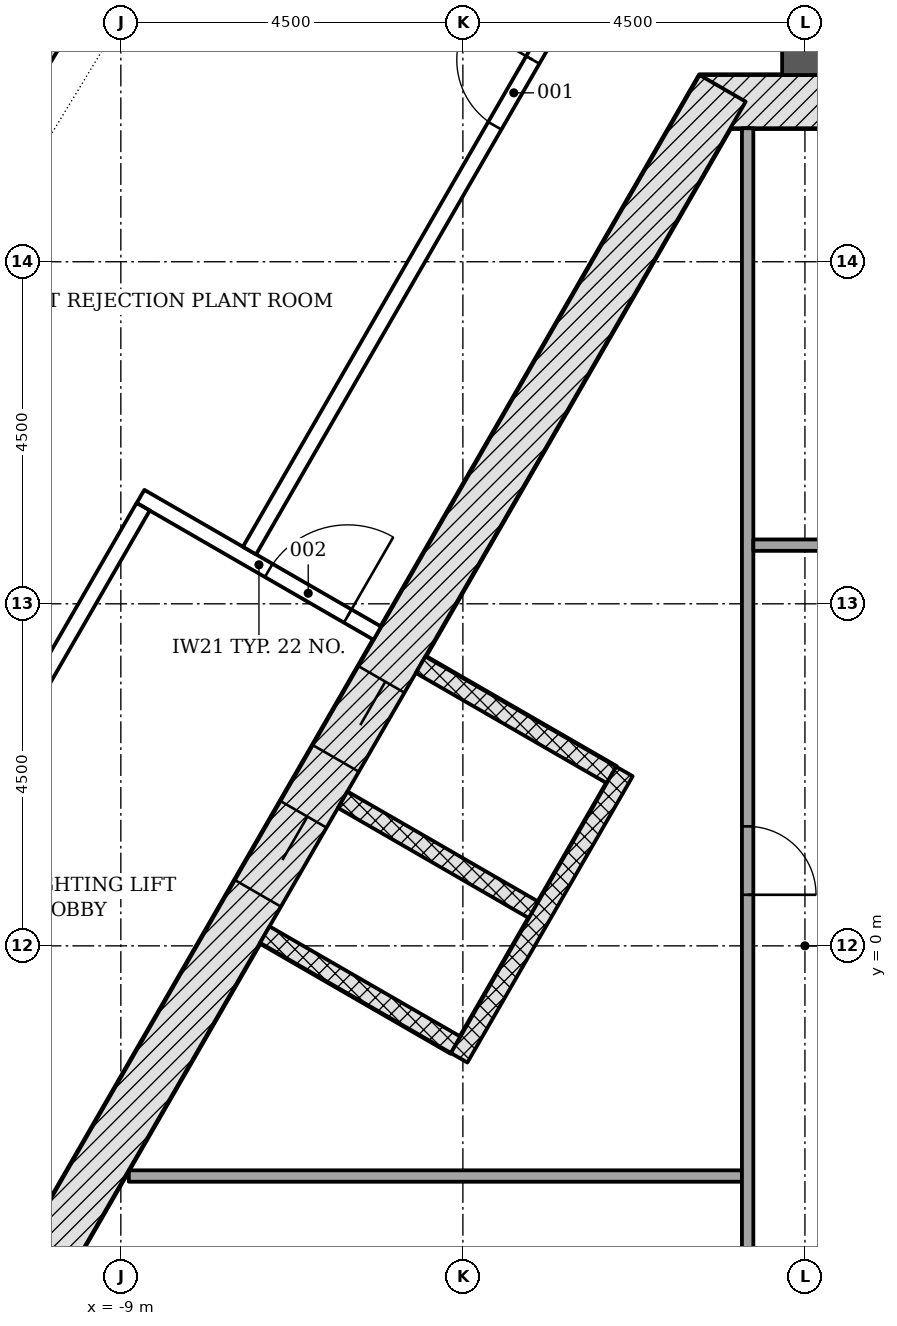
"""IFC4 building model, lengths in metres.
Left out: names, types, materials, properties, quantities, classifications, styles, units other than length and angle.
Written with IfcOpenShell. Run it as: python <this file> out.ifc"""

import sys

from ifc_helpers import new_model, si_unit, direction, frame, frame_2d, origin, place, context, subcontext, project, spatial, polyline, rectangle, outline, extrude, element, fill, save


model = new_model("IFC4")
c1 = context("Model", 3, precision=1e-05, world=origin(), true_north=direction((0.0, 1.0)))
c2 = subcontext(c1, "Body", "Model", "MODEL_VIEW")
j1 = project(units=[si_unit("LENGTHUNIT", "METRE"), si_unit("PLANEANGLEUNIT", "RADIAN")], contexts=[c1])
p1 = place(None, origin())
s1 = spatial("IfcSite", under=j1, at=p1, CompositionType="ELEMENT")
p2 = place(p1, origin())
s2 = spatial("IfcBuilding", under=s1, at=p2, CompositionType="ELEMENT")
p3 = place(p2, frame((0.0, 0.0, 297.6)))
s3 = spatial("IfcBuildingStorey", under=s2, at=p3, CompositionType="ELEMENT", Elevation=297.6)
p4 = place(p3, frame((1.386, 11.106, -0.25), z_axis=(0.0, 0.0, 1.0), x_axis=(-1.0, 0.0, 0.0)))
e1 = element("IfcWall", 1, at=p4, inside=s3, PredefinedType="SHEAR", context=c2, shape_type="SweptSolid", body=[
    extrude(rectangle(XDim=2.771, YDim=0.7, at=frame_2d((1.386, 0.0))), origin(), (0.0, 0.0, 1.0), 4.5),
])
p5 = place(p3, frame((-1.083, 11.281, -0.25), z_axis=(0.0, 0.0, 1.0), x_axis=(-0.500001446645, -0.866024568562, 0.0)))
e2 = element("IfcWall", 2, at=p5, inside=s3, PredefinedType="SHEAR", context=c2, shape_type="SweptSolid", body=[
    extrude(rectangle(XDim=18.458, YDim=0.7, at=frame_2d((9.229, 0.0))), origin(), (0.0, 0.0, 1.0), 4.5),
])
p6 = place(p5, frame((8.979, 0.0, 0.25)))
e3 = element("IfcOpeningElement", 3, at=p6, cuts=e2, PredefinedType="OPENING", context=c2, shape_type="SweptSolid", body=[
    extrude(rectangle(XDim=1.2, YDim=2.1, at=frame_2d((0.6, 1.05))), frame((0.0, 0.36, 0.0), z_axis=(0.0, -1.0, 0.0), x_axis=(1.0, 0.0, 0.0)), (0.0, 0.0, 1.0), 0.72),
])
p7 = place(p5, frame((11.029, 0.0, 0.25)))
e4 = element("IfcOpeningElement", 4, at=p7, cuts=e2, PredefinedType="OPENING", context=c2, shape_type="SweptSolid", body=[
    extrude(rectangle(XDim=1.2, YDim=2.1, at=frame_2d((0.6, 1.05))), frame((0.0, 0.36, 0.0), z_axis=(0.0, -1.0, 0.0), x_axis=(1.0, 0.0, 0.0)), (0.0, 0.0, 1.0), 0.72),
])
p8 = place(p3, frame((0.0, 11.456, -0.25), z_axis=(0.0, 0.0, 1.0), x_axis=(0.0, 1.0, 0.0)))
e5 = element("IfcWall", 5, at=p8, inside=s3, PredefinedType="SHEAR", context=c2, shape_type="SweptSolid", body=[
    extrude(rectangle(XDim=6.679, YDim=0.6, at=frame_2d((3.339, 0.0))), origin(), (0.0, 0.0, 1.0), 4.5),
])
p9 = place(p3, origin())
e6 = element("IfcWall", 6, at=p9, inside=s3, PredefinedType="NOTDEFINED", context=c2, shape_type="SweptSolid", body=[
    extrude(outline(polyline([(-6.901, 16.968), (-9.33, 13.179), (-11.669, 9.335), (-11.413, 9.179), (-9.075, 13.02), (-6.649, 16.806), (-6.901, 16.968)])), origin(), (0.0, 0.0, 1.0), 4.25),
])
for number, where, z_axis, x_axis in (
    (7, (-5.056, 3.699, -0.25), (0.0, 0.0, 1.0), (0.866, -0.5, 0.0)),
    (8, (-6.081, 1.923, -0.25), (0.0, 0.0, 1.0), (0.866, -0.5, 0.0)),
    (9, (-7.106, 0.148, -0.25), (0.0, 0.0, 1.0), (0.866, -0.5, 0.0)),
):
    element("IfcWall", number, at=place(p3, frame(where, z_axis=z_axis, x_axis=x_axis)), inside=s3, PredefinedType="PARTITIONING", context=c2, shape_type="SweptSolid", body=[
        extrude(rectangle(XDim=2.9, YDim=0.25, at=frame_2d((1.45, 0.0))), origin(), (0.0, 0.0, 1.0), 4.5),
    ])
p10 = place(p3, frame((-2.374, 2.294, 0.0), z_axis=(0.0, 0.0, 1.0), x_axis=(-0.499996127374, -0.866027639635, 0.0)))
e10 = element("IfcWall", 10, at=p10, inside=s3, PredefinedType="PARTITIONING", context=c2, shape_type="SweptSolid", body=[
    extrude(rectangle(XDim=4.35, YDim=0.25, at=frame_2d((2.175, 0.0))), origin(), (0.0, 0.0, 1.0), 4.25),
])
p11 = place(p3, frame((-8.895, -3.028, 0.0), z_axis=(0.0, 0.0, 1.0), x_axis=(1.0, 0.0, 0.0)))
e11 = element("IfcWall", 11, at=p11, inside=s3, PredefinedType="PARTITIONING", context=c2, shape_type="SweptSolid", body=[
    extrude(rectangle(XDim=8.066, YDim=0.15, at=frame_2d((4.033, 0.0))), origin(), (0.0, 0.0, 1.0), 4.25),
])
p12 = place(p3, frame((-0.754, 10.756, 0.0), z_axis=(0.0, 0.0, 1.0), x_axis=(0.0, -1.0, 0.0)))
e12 = element("IfcWall", 12, at=p12, inside=s3, PredefinedType="PARTITIONING", context=c2, shape_type="SweptSolid", body=[
    extrude(rectangle(XDim=16.985, YDim=0.15, at=frame_2d((8.492, 0.0))), origin(), (0.0, 0.0, 1.0), 4.25),
])
p13 = place(p12, frame((9.185, 0.0, 0.0)))
e13 = element("IfcOpeningElement", 13, at=p13, cuts=e12, PredefinedType="OPENING", context=c2, shape_type="SweptSolid", body=[
    extrude(rectangle(XDim=0.9, YDim=2.1, at=frame_2d((0.45, 1.05))), frame((0.0, 0.085, 0.0), z_axis=(0.0, -1.0, 0.0), x_axis=(1.0, 0.0, 0.0)), (0.0, 0.0, 1.0), 0.17),
])
p14 = place(p3, frame((-0.679, 5.272, 0.0), z_axis=(0.0, 0.0, 1.0), x_axis=(1.0, 0.0, 0.0)))
e14 = element("IfcWall", 14, at=p14, inside=s3, PredefinedType="PARTITIONING", context=c2, shape_type="SweptSolid", body=[
    extrude(rectangle(XDim=1.375, YDim=0.15, at=frame_2d((0.688, 0.0))), origin(), (0.0, 0.0, 1.0), 4.25),
])
p15 = place(p3, frame((-8.741, 5.913, 0.0), z_axis=(0.0, 0.0, 1.0), x_axis=(0.866017220491, -0.500014173611, 0.0)))
e15 = element("IfcWall", 15, at=p15, inside=s3, PredefinedType="PARTITIONING", context=c2, shape_type="SweptSolid", body=[
    extrude(rectangle(XDim=3.598, YDim=0.2, at=frame_2d((1.799, 0.0))), origin(), (0.0, 0.0, 1.0), 4.25),
])
p16 = place(p15, frame((1.948, 0.0, 0.0)))
e16 = element("IfcOpeningElement", 16, at=p16, cuts=e15, PredefinedType="OPENING", context=c2, shape_type="SweptSolid", body=[
    extrude(rectangle(XDim=1.2, YDim=2.1, at=frame_2d((0.6, 1.05))), frame((0.0, 0.11, 0.0), z_axis=(0.0, -1.0, 0.0), x_axis=(1.0, 0.0, 0.0)), (0.0, 0.0, 1.0), 0.22),
])
p17 = place(p3, frame((-12.658, -1.068, 0.0), z_axis=(0.0, 0.0, 1.0), x_axis=(0.499996073327, 0.866027670838, 0.0)))
e17 = element("IfcWall", 17, at=p17, inside=s3, PredefinedType="PARTITIONING", context=c2, shape_type="SweptSolid", body=[
    extrude(rectangle(XDim=7.904, YDim=0.2, at=frame_2d((3.952, 0.0))), origin(), (0.0, 0.0, 1.0), 3.702),
])
p18 = place(p17, frame((0.541, 0.0, 0.0)))
e18 = element("IfcOpeningElement", 18, at=p18, cuts=e17, PredefinedType="OPENING", context=c2, shape_type="SweptSolid", body=[
    extrude(rectangle(XDim=1.2, YDim=2.1, at=frame_2d((0.6, 1.05))), frame((0.0, 0.11, 0.0), z_axis=(0.0, -1.0, 0.0), x_axis=(1.0, 0.0, 0.0)), (0.0, 0.0, 1.0), 0.22),
])
p19 = place(p3, frame((-7.307, 5.2, 0.0), z_axis=(0.0, 0.0, 1.0), x_axis=(0.49999780173, 0.866026672953, 0.0)))
e19 = element("IfcWall", 19, at=p19, inside=s3, PredefinedType="PARTITIONING", context=c2, shape_type="SweptSolid", body=[
    extrude(rectangle(XDim=13.841, YDim=0.2, at=frame_2d((6.92, 0.0))), origin(), (0.0, 0.0, 1.0), 3.702),
])
p20 = place(p19, frame((6.454, 0.0, 0.0)))
e20 = element("IfcOpeningElement", 20, at=p20, cuts=e19, PredefinedType="OPENING", context=c2, shape_type="SweptSolid", body=[
    extrude(rectangle(XDim=1.0, YDim=2.1, at=frame_2d((0.5, 1.05))), frame((0.0, 0.11, 0.0), z_axis=(0.0, -1.0, 0.0), x_axis=(1.0, 0.0, 0.0)), (0.0, 0.0, 1.0), 0.22),
])
p21 = place(p6, origin())
e21 = element("IfcDoor", 21, at=p21, inside=s3, OperationType="DOUBLE_DOOR_SLIDING", PredefinedType="DOOR", context=c2, shape_type="SweptSolid", body=[
    extrude(rectangle(XDim=1.2, YDim=2.1, at=frame_2d((0.6, 1.05))), frame((0.0, 0.025, 0.0), z_axis=(0.0, -1.0, 0.0), x_axis=(1.0, 0.0, 0.0)), (0.0, 0.0, 1.0), 0.05),
])
fill(e3, e21)
p22 = place(p7, origin())
e22 = element("IfcDoor", 22, at=p22, inside=s3, OperationType="DOUBLE_DOOR_SLIDING", PredefinedType="DOOR", context=c2, shape_type="SweptSolid", body=[
    extrude(rectangle(XDim=1.2, YDim=2.1, at=frame_2d((0.6, 1.05))), frame((0.0, 0.025, 0.0), z_axis=(0.0, -1.0, 0.0), x_axis=(1.0, 0.0, 0.0)), (0.0, 0.0, 1.0), 0.05),
])
fill(e4, e22)
p23 = place(p13, origin())
e23 = element("IfcDoor", 23, at=p23, inside=s3, OperationType="SINGLE_SWING_RIGHT", PredefinedType="DOOR", context=c2, shape_type="SweptSolid", body=[
    extrude(rectangle(XDim=0.9, YDim=2.1, at=frame_2d((0.45, 1.05))), frame((0.0, 0.025, 0.0), z_axis=(0.0, -1.0, 0.0), x_axis=(1.0, 0.0, 0.0)), (0.0, 0.0, 1.0), 0.05),
])
fill(e13, e23)
p24 = place(p20, origin())
e24 = element("IfcDoor", 24, at=p24, inside=s3, OperationType="SINGLE_SWING_RIGHT", PredefinedType="DOOR", context=c2, shape_type="SweptSolid", body=[
    extrude(rectangle(XDim=1.0, YDim=2.1, at=frame_2d((0.5, 1.05))), frame((0.0, 0.025, 0.0), z_axis=(0.0, -1.0, 0.0), x_axis=(1.0, 0.0, 0.0)), (0.0, 0.0, 1.0), 0.05),
])
fill(e20, e24)
p25 = place(p16, origin())
e25 = element("IfcDoor", 25, at=p25, inside=s3, OperationType="SINGLE_SWING_RIGHT", PredefinedType="DOOR", context=c2, shape_type="SweptSolid", body=[
    extrude(rectangle(XDim=1.2, YDim=2.1, at=frame_2d((0.6, 1.05))), frame((0.0, 0.025, 0.0), z_axis=(0.0, -1.0, 0.0), x_axis=(1.0, 0.0, 0.0)), (0.0, 0.0, 1.0), 0.05),
])
fill(e16, e25)
save(model, sys.argv[1])
